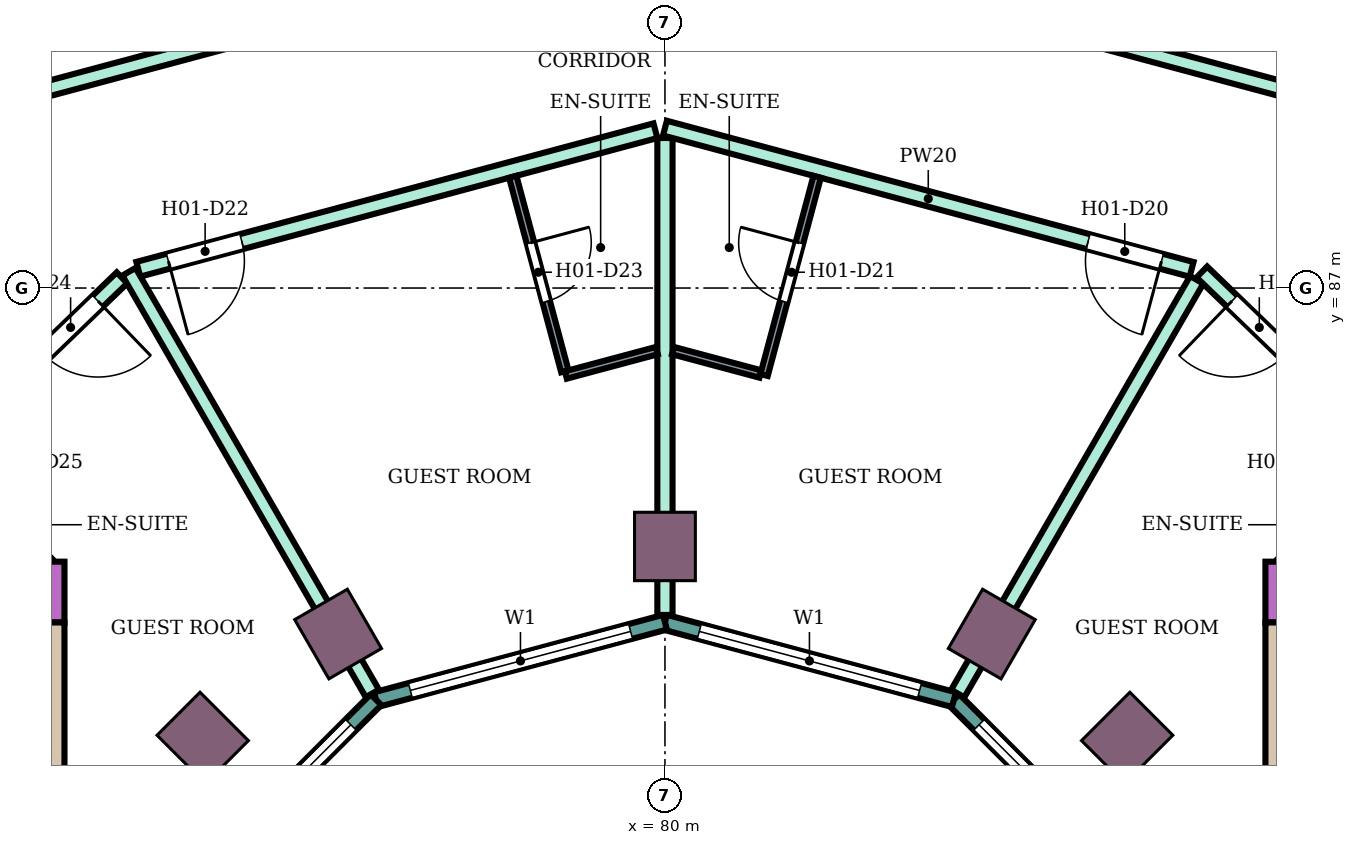
"""IFC4 building model, lengths in metres.
Left out: names, types, materials, properties, quantities, classifications, styles, units other than length and angle.
Written with IfcOpenShell. Run it as: python <this file> out.ifc"""

import sys

from ifc_helpers import new_model, si_unit, direction, frame, frame_2d, origin, origin_2d, place, context, subcontext, project, spatial, rectangle, extrude, element, fill, save


model = new_model("IFC4")
c1 = context("Model", 3, precision=1e-05, world=origin(), true_north=direction((0.0, 1.0)))
c2 = subcontext(c1, "Body", "Model", "MODEL_VIEW")
j1 = project(units=[si_unit("LENGTHUNIT", "METRE"), si_unit("PLANEANGLEUNIT", "RADIAN")], contexts=[c1])
p1 = place(None, origin())
s1 = spatial("IfcSite", under=j1, at=p1, CompositionType="ELEMENT")
p2 = place(p1, origin())
s2 = spatial("IfcBuilding", under=s1, at=p2, CompositionType="ELEMENT")
p3 = place(p2, frame((0.0, 0.0, 32.6)))
s3 = spatial("IfcBuildingStorey", under=s2, at=p3, CompositionType="ELEMENT", Elevation=32.6)
for number, where, z_axis, x_axis in (
    (1, (86.081, 81.081, 0.0), (0.0, 0.0, 1.0), (0.707, 0.707, 0.0)),
    (2, (84.3, 82.448, 0.0), (0.0, 0.0, 1.0), (0.5, 0.866, 0.0)),
    (3, (80.0, 83.6, 0.0), (0.0, 0.0, 1.0), (0.0, 1.0, 0.0)),
    (4, (75.7, 82.448, 0.0), (0.0, 0.0, 1.0), (-0.5, 0.866, 0.0)),
    (5, (73.919, 81.081, 0.0), (0.0, 0.0, 1.0), (-0.707, 0.707, 0.0)),
):
    element("IfcColumn", number, at=place(p3, frame(where, z_axis=z_axis, x_axis=x_axis)), inside=s3, PredefinedType="COLUMN", context=c2, shape_type="SweptSolid", body=[
        extrude(rectangle(XDim=0.9, YDim=0.8, at=origin_2d()), origin(), (0.0, 0.0, 1.0), 3.8),
    ])
p4 = place(p3, frame((87.9, 83.0, 0.0), z_axis=(0.0, 0.0, 1.0), x_axis=(1.0, 0.0, 0.0)))
e6 = element("IfcWall", 6, at=p4, inside=s3, PredefinedType="SHEAR", context=c2, shape_type="SweptSolid", body=[
    extrude(rectangle(XDim=14.7, YDim=0.8, at=frame_2d((7.35, 0.0))), origin(), (0.0, 0.0, 1.0), 3.48),
])
p5 = place(p4, frame((4.2, 0.0, 0.0)))
e7 = element("IfcOpeningElement", 7, at=p5, cuts=e6, PredefinedType="OPENING", context=c2, shape_type="SweptSolid", body=[
    extrude(rectangle(XDim=2.4, YDim=2.4, at=frame_2d((1.2, 1.2))), frame((0.0, 0.41, 0.0), z_axis=(0.0, -1.0, 0.0), x_axis=(1.0, 0.0, 0.0)), (0.0, 0.0, 1.0), 0.82),
])
p6 = place(p3, frame((88.125, 75.0, 0.0), z_axis=(0.0, 0.0, 1.0), x_axis=(0.0, 1.0, 0.0)))
e8 = element("IfcWall", 8, at=p6, inside=s3, PredefinedType="SHEAR", context=c2, shape_type="SweptSolid", body=[
    extrude(rectangle(XDim=7.6, YDim=0.45, at=frame_2d((3.8, 0.0))), origin(), (0.0, 0.0, 1.0), 3.48),
])
p7 = place(p3, frame((72.1, 83.0, 0.0), z_axis=(0.0, 0.0, 1.0), x_axis=(-1.0, 0.0, 0.0)))
e9 = element("IfcWall", 9, at=p7, inside=s3, PredefinedType="SHEAR", context=c2, shape_type="SweptSolid", body=[
    extrude(rectangle(XDim=14.7, YDim=0.8, at=frame_2d((7.35, 0.0))), origin(), (0.0, 0.0, 1.0), 3.48),
])
p8 = place(p7, frame((4.2, 0.0, 0.0)))
e10 = element("IfcOpeningElement", 10, at=p8, cuts=e9, PredefinedType="OPENING", context=c2, shape_type="SweptSolid", body=[
    extrude(rectangle(XDim=2.4, YDim=2.4, at=frame_2d((1.2, 1.2))), frame((0.0, 0.41, 0.0), z_axis=(0.0, -1.0, 0.0), x_axis=(1.0, 0.0, 0.0)), (0.0, 0.0, 1.0), 0.82),
])
p9 = place(p3, frame((71.875, 82.6, 0.0), z_axis=(0.0, 0.0, 1.0), x_axis=(0.0, -1.0, 0.0)))
e11 = element("IfcWall", 11, at=p9, inside=s3, PredefinedType="SHEAR", context=c2, shape_type="SweptSolid", body=[
    extrude(rectangle(XDim=7.6, YDim=0.45, at=frame_2d((3.8, 0.0))), origin(), (0.0, 0.0, 1.0), 3.48),
])
p10 = place(p3, frame((86.585, 78.802, 0.0), z_axis=(0.0, 0.0, 1.0), x_axis=(-0.707106781187, 0.707106781187, 0.0)))
e12 = element("IfcWall", 12, at=p10, inside=s3, PredefinedType="NOTDEFINED", context=c2, shape_type="SweptSolid", body=[
    extrude(rectangle(XDim=3.936, YDim=0.2, at=frame_2d((1.968, 0.0))), origin(), (0.0, 0.0, 1.0), 3.8),
])
p11 = place(p10, frame((0.468, 0.0, 0.9)))
e13 = element("IfcOpeningElement", 13, at=p11, cuts=e12, PredefinedType="OPENING", context=c2, shape_type="SweptSolid", body=[
    extrude(rectangle(XDim=3.0, YDim=2.3, at=frame_2d((1.5, 1.15))), frame((0.0, 0.11, 0.0), z_axis=(0.0, -1.0, 0.0), x_axis=(1.0, 0.0, 0.0)), (0.0, 0.0, 1.0), 0.22),
])
p12 = place(p3, frame((83.802, 81.585, 0.0), z_axis=(0.0, 0.0, 1.0), x_axis=(-0.965933654434, 0.258789828301, 0.0)))
e14 = element("IfcWall", 14, at=p12, inside=s3, PredefinedType="NOTDEFINED", context=c2, shape_type="SweptSolid", body=[
    extrude(rectangle(XDim=3.936, YDim=0.2, at=frame_2d((1.968, 0.0))), origin(), (0.0, 0.0, 1.0), 3.8),
])
p13 = place(p12, frame((0.468, 0.0, 0.9)))
e15 = element("IfcOpeningElement", 15, at=p13, cuts=e14, PredefinedType="OPENING", context=c2, shape_type="SweptSolid", body=[
    extrude(rectangle(XDim=3.0, YDim=2.3, at=frame_2d((1.5, 1.15))), frame((0.0, 0.11, 0.0), z_axis=(0.0, -1.0, 0.0), x_axis=(1.0, 0.0, 0.0)), (0.0, 0.0, 1.0), 0.22),
])
p14 = place(p3, frame((80.0, 82.604, 0.0), z_axis=(0.0, 0.0, 1.0), x_axis=(-0.965933654434, -0.258789828301, 0.0)))
e16 = element("IfcWall", 16, at=p14, inside=s3, PredefinedType="NOTDEFINED", context=c2, shape_type="SweptSolid", body=[
    extrude(rectangle(XDim=3.936, YDim=0.2, at=frame_2d((1.968, 0.0))), origin(), (0.0, 0.0, 1.0), 3.8),
])
p15 = place(p14, frame((0.468, 0.0, 0.9)))
e17 = element("IfcOpeningElement", 17, at=p15, cuts=e16, PredefinedType="OPENING", context=c2, shape_type="SweptSolid", body=[
    extrude(rectangle(XDim=3.0, YDim=2.3, at=frame_2d((1.5, 1.15))), frame((0.0, 0.11, 0.0), z_axis=(0.0, -1.0, 0.0), x_axis=(1.0, 0.0, 0.0)), (0.0, 0.0, 1.0), 0.22),
])
p16 = place(p3, frame((76.198, 81.585, 0.0), z_axis=(0.0, 0.0, 1.0), x_axis=(-0.707106781187, -0.707106781187, 0.0)))
e18 = element("IfcWall", 18, at=p16, inside=s3, PredefinedType="NOTDEFINED", context=c2, shape_type="SweptSolid", body=[
    extrude(rectangle(XDim=3.936, YDim=0.2, at=frame_2d((1.968, 0.0))), origin(), (0.0, 0.0, 1.0), 3.8),
])
p17 = place(p16, frame((0.468, 0.0, 0.9)))
e19 = element("IfcOpeningElement", 19, at=p17, cuts=e18, PredefinedType="OPENING", context=c2, shape_type="SweptSolid", body=[
    extrude(rectangle(XDim=3.0, YDim=2.3, at=frame_2d((1.5, 1.15))), frame((0.0, 0.11, 0.0), z_axis=(0.0, -1.0, 0.0), x_axis=(1.0, 0.0, 0.0)), (0.0, 0.0, 1.0), 0.22),
])
p18 = place(p3, frame((68.987, 83.4, 0.0), z_axis=(0.0, 0.0, 1.0), x_axis=(0.719591503389, 0.694397629784, 0.0)))
e20 = element("IfcWall", 20, at=p18, inside=s3, PredefinedType="PARTITIONING", context=c2, shape_type="SweptSolid", body=[
    extrude(rectangle(XDim=5.378, YDim=0.2, at=frame_2d((2.689, 0.0))), origin(), (0.0, 0.0, 1.0), 3.35),
])
p19 = place(p18, frame((3.938, 0.0, 0.0)))
e21 = element("IfcOpeningElement", 21, at=p19, cuts=e20, PredefinedType="OPENING", context=c2, shape_type="SweptSolid", body=[
    extrude(rectangle(XDim=1.0, YDim=2.1, at=frame_2d((0.5, 1.05))), frame((0.0, 0.11, 0.0), z_axis=(0.0, -1.0, 0.0), x_axis=(1.0, 0.0, 0.0)), (0.0, 0.0, 1.0), 0.22),
])
p20 = place(p3, frame((71.614, 89.55, 0.0), z_axis=(0.0, 0.0, 1.0), x_axis=(0.965982156828, 0.258608725086, 0.0)))
e22 = element("IfcWall", 22, at=p20, inside=s3, PredefinedType="PARTITIONING", context=c2, shape_type="SweptSolid", body=[
    extrude(rectangle(XDim=8.592, YDim=0.2, at=frame_2d((4.296, 0.0))), origin(), (0.0, 0.0, 1.0), 3.35),
])
p21 = place(p20, frame((4.865, 0.0, 0.0)))
e23 = element("IfcOpeningElement", 23, at=p21, cuts=e22, PredefinedType="OPENING", context=c2, shape_type="SweptSolid", body=[
    extrude(rectangle(XDim=1.0, YDim=2.1, at=frame_2d((0.5, 1.05))), frame((0.0, 0.11, 0.0), z_axis=(0.0, -1.0, 0.0), x_axis=(1.0, 0.0, 0.0)), (0.0, 0.0, 1.0), 0.22),
])
p22 = place(p20, frame((2.804, 0.0, 0.0)))
e24 = element("IfcOpeningElement", 24, at=p22, cuts=e22, PredefinedType="OPENING", context=c2, shape_type="SweptSolid", body=[
    extrude(rectangle(XDim=1.0, YDim=2.1, at=frame_2d((0.5, 1.05))), frame((0.0, 0.11, 0.0), z_axis=(0.0, -1.0, 0.0), x_axis=(1.0, 0.0, 0.0)), (0.0, 0.0, 1.0), 0.22),
])
p23 = place(p3, frame((73.071, 87.247, 0.0), z_axis=(0.0, 0.0, 1.0), x_axis=(0.965931651205, 0.258797305243, 0.0)))
e25 = element("IfcWall", 25, at=p23, inside=s3, PredefinedType="PARTITIONING", context=c2, shape_type="SweptSolid", body=[
    extrude(rectangle(XDim=7.043, YDim=0.2, at=frame_2d((3.521, 0.0))), origin(), (0.0, 0.0, 1.0), 3.35),
])
p24 = place(p23, frame((0.41, 0.0, 0.0)))
e26 = element("IfcOpeningElement", 26, at=p24, cuts=e25, PredefinedType="OPENING", context=c2, shape_type="SweptSolid", body=[
    extrude(rectangle(XDim=1.0, YDim=2.1, at=frame_2d((0.5, 1.05))), frame((0.0, 0.11, 0.0), z_axis=(0.0, -1.0, 0.0), x_axis=(1.0, 0.0, 0.0)), (0.0, 0.0, 1.0), 0.22),
])
p25 = place(p3, frame((72.948, 87.214, 0.0), z_axis=(0.0, 0.0, 1.0), x_axis=(0.499943524694, -0.866058007363, 0.0)))
e27 = element("IfcWall", 27, at=p25, inside=s3, PredefinedType="PARTITIONING", context=c2, shape_type="SweptSolid", body=[
    extrude(rectangle(XDim=6.405, YDim=0.2, at=frame_2d((3.203, 0.0))), origin(), (0.0, 0.0, 1.0), 3.35),
])
p26 = place(p3, frame((80.0, 82.699, 0.0), z_axis=(0.0, 0.0, 1.0), x_axis=(0.0, 1.0, 0.0)))
e28 = element("IfcWall", 28, at=p26, inside=s3, PredefinedType="PARTITIONING", context=c2, shape_type="SweptSolid", body=[
    extrude(rectangle(XDim=6.275, YDim=0.2, at=frame_2d((3.138, 0.0))), origin(), (0.0, 0.0, 1.0), 3.35),
])
p27 = place(p3, frame((80.0, 89.104, 0.0), z_axis=(0.0, 0.0, 1.0), x_axis=(0.965856548257, -0.259077455964, 0.0)))
e29 = element("IfcWall", 29, at=p27, inside=s3, PredefinedType="PARTITIONING", context=c2, shape_type="SweptSolid", body=[
    extrude(rectangle(XDim=7.173, YDim=0.2, at=frame_2d((3.586, 0.0))), origin(), (0.0, 0.0, 1.0), 3.35),
])
p28 = place(p27, frame((5.763, 0.0, 0.0)))
e30 = element("IfcOpeningElement", 30, at=p28, cuts=e29, PredefinedType="OPENING", context=c2, shape_type="SweptSolid", body=[
    extrude(rectangle(XDim=1.0, YDim=2.1, at=frame_2d((0.5, 1.05))), frame((0.0, 0.11, 0.0), z_axis=(0.0, -1.0, 0.0), x_axis=(1.0, 0.0, 0.0)), (0.0, 0.0, 1.0), 0.22),
])
p29 = place(p3, frame((80.0, 91.797, 0.0), z_axis=(0.0, 0.0, 1.0), x_axis=(0.965857042792, -0.259075612301, 0.0)))
e31 = element("IfcWall", 31, at=p29, inside=s3, PredefinedType="PARTITIONING", context=c2, shape_type="SweptSolid", body=[
    extrude(rectangle(XDim=8.602, YDim=0.2, at=frame_2d((4.301, 0.0))), origin(), (0.0, 0.0, 1.0), 3.35),
])
p30 = place(p29, frame((4.877, 0.0, 0.0)))
e32 = element("IfcOpeningElement", 32, at=p30, cuts=e31, PredefinedType="OPENING", context=c2, shape_type="SweptSolid", body=[
    extrude(rectangle(XDim=1.0, YDim=2.1, at=frame_2d((0.5, 1.05))), frame((0.0, 0.11, 0.0), z_axis=(0.0, -1.0, 0.0), x_axis=(1.0, 0.0, 0.0)), (0.0, 0.0, 1.0), 0.22),
])
p31 = place(p29, frame((2.73, 0.0, 0.0)))
e33 = element("IfcOpeningElement", 33, at=p31, cuts=e31, PredefinedType="OPENING", context=c2, shape_type="SweptSolid", body=[
    extrude(rectangle(XDim=1.1, YDim=2.1, at=frame_2d((0.55, 1.05))), frame((0.0, 0.11, 0.0), z_axis=(0.0, -1.0, 0.0), x_axis=(1.0, 0.0, 0.0)), (0.0, 0.0, 1.0), 0.22),
])
p32 = place(p3, frame((83.852, 81.665, 0.0), z_axis=(0.0, 0.0, 1.0), x_axis=(0.500253653624, 0.865878907259, 0.0)))
e34 = element("IfcWall", 34, at=p32, inside=s3, PredefinedType="PARTITIONING", context=c2, shape_type="SweptSolid", body=[
    extrude(rectangle(XDim=6.285, YDim=0.2, at=frame_2d((3.143, 0.0))), origin(), (0.0, 0.0, 1.0), 3.35),
])
p33 = place(p3, frame((87.064, 87.211, 0.0), z_axis=(0.0, 0.0, 1.0), x_axis=(0.719540958932, -0.694450004262, 0.0)))
e35 = element("IfcWall", 35, at=p33, inside=s3, PredefinedType="PARTITIONING", context=c2, shape_type="SweptSolid", body=[
    extrude(rectangle(XDim=5.488, YDim=0.2, at=frame_2d((2.744, 0.0))), origin(), (0.0, 0.0, 1.0), 3.35),
])
p34 = place(p33, frame((0.55, 0.0, 0.0)))
e36 = element("IfcOpeningElement", 36, at=p34, cuts=e35, PredefinedType="OPENING", context=c2, shape_type="SweptSolid", body=[
    extrude(rectangle(XDim=1.0, YDim=2.1, at=frame_2d((0.5, 1.05))), frame((0.0, 0.11, 0.0), z_axis=(0.0, -1.0, 0.0), x_axis=(1.0, 0.0, 0.0)), (0.0, 0.0, 1.0), 0.22),
])
p35 = place(p3, frame((77.998, 88.463, 0.0), z_axis=(0.0, 0.0, 1.0), x_axis=(0.258677737588, -0.965963678446, 0.0)))
e37 = element("IfcWall", 37, at=p35, inside=s3, PredefinedType="PARTITIONING", context=c2, shape_type="SweptSolid", body=[
    extrude(rectangle(XDim=2.649, YDim=0.1, at=frame_2d((1.325, 0.0))), origin(), (0.0, 0.0, 1.0), 3.35),
])
p36 = place(p35, frame((0.9, 0.0, 0.0)))
e38 = element("IfcOpeningElement", 38, at=p36, cuts=e37, PredefinedType="OPENING", context=c2, shape_type="SweptSolid", body=[
    extrude(rectangle(XDim=0.8, YDim=2.1, at=frame_2d((0.4, 1.05))), frame((0.0, 0.06, 0.0), z_axis=(0.0, -1.0, 0.0), x_axis=(1.0, 0.0, 0.0)), (0.0, 0.0, 1.0), 0.12),
])
p37 = place(p3, frame((78.696, 85.856, 0.0), z_axis=(0.0, 0.0, 1.0), x_axis=(0.966002513606, 0.258532674351, 0.0)))
e39 = element("IfcWall", 39, at=p37, inside=s3, PredefinedType="PARTITIONING", context=c2, shape_type="SweptSolid", body=[
    extrude(rectangle(XDim=1.24, YDim=0.1, at=frame_2d((0.62, 0.0))), origin(), (0.0, 0.0, 1.0), 3.35),
])
p38 = place(p3, frame((80.106, 86.177, 0.0), z_axis=(0.0, 0.0, 1.0), x_axis=(0.966002973184, -0.258530957139, 0.0)))
e40 = element("IfcWall", 40, at=p38, inside=s3, PredefinedType="PARTITIONING", context=c2, shape_type="SweptSolid", body=[
    extrude(rectangle(XDim=1.19, YDim=0.1, at=frame_2d((0.595, 0.0))), origin(), (0.0, 0.0, 1.0), 3.35),
])
p39 = place(p3, frame((81.304, 85.856, 0.0), z_axis=(0.0, 0.0, 1.0), x_axis=(0.25867580527, 0.965964195904, 0.0)))
e41 = element("IfcWall", 41, at=p39, inside=s3, PredefinedType="PARTITIONING", context=c2, shape_type="SweptSolid", body=[
    extrude(rectangle(XDim=2.699, YDim=0.1, at=frame_2d((1.35, 0.0))), origin(), (0.0, 0.0, 1.0), 3.35),
])
p40 = place(p39, frame((1.0, 0.0, 0.0)))
e42 = element("IfcOpeningElement", 42, at=p40, cuts=e41, PredefinedType="OPENING", context=c2, shape_type="SweptSolid", body=[
    extrude(rectangle(XDim=0.8, YDim=2.1, at=frame_2d((0.4, 1.05))), frame((0.0, 0.06, 0.0), z_axis=(0.0, -1.0, 0.0), x_axis=(1.0, 0.0, 0.0)), (0.0, 0.0, 1.0), 0.12),
])
p41 = place(p11, origin())
e43 = element("IfcWindow", 43, at=p41, inside=s3, PartitioningType="SINGLE_PANEL", PredefinedType="WINDOW", context=c2, shape_type="SweptSolid", body=[
    extrude(rectangle(XDim=3.0, YDim=2.3, at=frame_2d((1.5, 1.15))), frame((0.0, 0.03, 0.0), z_axis=(0.0, -1.0, 0.0), x_axis=(1.0, 0.0, 0.0)), (0.0, 0.0, 1.0), 0.06),
])
fill(e13, e43)
p42 = place(p13, origin())
e44 = element("IfcWindow", 44, at=p42, inside=s3, PartitioningType="SINGLE_PANEL", PredefinedType="WINDOW", context=c2, shape_type="SweptSolid", body=[
    extrude(rectangle(XDim=3.0, YDim=2.3, at=frame_2d((1.5, 1.15))), frame((0.0, 0.03, 0.0), z_axis=(0.0, -1.0, 0.0), x_axis=(1.0, 0.0, 0.0)), (0.0, 0.0, 1.0), 0.06),
])
fill(e15, e44)
p43 = place(p15, origin())
e45 = element("IfcWindow", 45, at=p43, inside=s3, PartitioningType="SINGLE_PANEL", PredefinedType="WINDOW", context=c2, shape_type="SweptSolid", body=[
    extrude(rectangle(XDim=3.0, YDim=2.3, at=frame_2d((1.5, 1.15))), frame((0.0, 0.03, 0.0), z_axis=(0.0, -1.0, 0.0), x_axis=(1.0, 0.0, 0.0)), (0.0, 0.0, 1.0), 0.06),
])
fill(e17, e45)
p44 = place(p17, origin())
e46 = element("IfcWindow", 46, at=p44, inside=s3, PartitioningType="SINGLE_PANEL", PredefinedType="WINDOW", context=c2, shape_type="SweptSolid", body=[
    extrude(rectangle(XDim=3.0, YDim=2.3, at=frame_2d((1.5, 1.15))), frame((0.0, 0.03, 0.0), z_axis=(0.0, -1.0, 0.0), x_axis=(1.0, 0.0, 0.0)), (0.0, 0.0, 1.0), 0.06),
])
fill(e19, e46)
p45 = place(p34, frame((1.0, 0.0, 0.0), z_axis=(0.0, 0.0, 1.0), x_axis=(-1.0, 0.0, 0.0)))
e47 = element("IfcDoor", 47, at=p45, inside=s3, OperationType="SINGLE_SWING_RIGHT", PredefinedType="DOOR", context=c2, shape_type="SweptSolid", body=[
    extrude(rectangle(XDim=1.0, YDim=2.1, at=frame_2d((0.5, 1.05))), frame((0.0, 0.025, 0.0), z_axis=(0.0, -1.0, 0.0), x_axis=(1.0, 0.0, 0.0)), (0.0, 0.0, 1.0), 0.05),
])
fill(e36, e47)
p46 = place(p28, frame((1.0, 0.0, 0.0), z_axis=(0.0, 0.0, 1.0), x_axis=(-1.0, 0.0, 0.0)))
e48 = element("IfcDoor", 48, at=p46, inside=s3, OperationType="SINGLE_SWING_LEFT", PredefinedType="DOOR", context=c2, shape_type="SweptSolid", body=[
    extrude(rectangle(XDim=1.0, YDim=2.1, at=frame_2d((0.5, 1.05))), frame((0.0, 0.025, 0.0), z_axis=(0.0, -1.0, 0.0), x_axis=(1.0, 0.0, 0.0)), (0.0, 0.0, 1.0), 0.05),
])
fill(e30, e48)
p47 = place(p40, origin())
e49 = element("IfcDoor", 49, at=p47, inside=s3, OperationType="SINGLE_SWING_RIGHT", PredefinedType="DOOR", context=c2, shape_type="SweptSolid", body=[
    extrude(rectangle(XDim=0.8, YDim=2.1, at=frame_2d((0.4, 1.05))), frame((0.0, 0.025, 0.0), z_axis=(0.0, -1.0, 0.0), x_axis=(1.0, 0.0, 0.0)), (0.0, 0.0, 1.0), 0.05),
])
fill(e42, e49)
p48 = place(p24, frame((1.0, 0.0, 0.0), z_axis=(0.0, 0.0, 1.0), x_axis=(-1.0, 0.0, 0.0)))
e50 = element("IfcDoor", 50, at=p48, inside=s3, OperationType="SINGLE_SWING_RIGHT", PredefinedType="DOOR", context=c2, shape_type="SweptSolid", body=[
    extrude(rectangle(XDim=1.0, YDim=2.1, at=frame_2d((0.5, 1.05))), frame((0.0, 0.025, 0.0), z_axis=(0.0, -1.0, 0.0), x_axis=(1.0, 0.0, 0.0)), (0.0, 0.0, 1.0), 0.05),
])
fill(e26, e50)
p49 = place(p36, origin())
e51 = element("IfcDoor", 51, at=p49, inside=s3, OperationType="SINGLE_SWING_LEFT", PredefinedType="DOOR", context=c2, shape_type="SweptSolid", body=[
    extrude(rectangle(XDim=0.8, YDim=2.1, at=frame_2d((0.4, 1.05))), frame((0.0, 0.025, 0.0), z_axis=(0.0, -1.0, 0.0), x_axis=(1.0, 0.0, 0.0)), (0.0, 0.0, 1.0), 0.05),
])
fill(e38, e51)
p50 = place(p19, frame((1.0, 0.0, 0.0), z_axis=(0.0, 0.0, 1.0), x_axis=(-1.0, 0.0, 0.0)))
e52 = element("IfcDoor", 52, at=p50, inside=s3, OperationType="SINGLE_SWING_LEFT", PredefinedType="DOOR", context=c2, shape_type="SweptSolid", body=[
    extrude(rectangle(XDim=1.0, YDim=2.1, at=frame_2d((0.5, 1.05))), frame((0.0, 0.025, 0.0), z_axis=(0.0, -1.0, 0.0), x_axis=(1.0, 0.0, 0.0)), (0.0, 0.0, 1.0), 0.05),
])
fill(e21, e52)
save(model, sys.argv[1])
